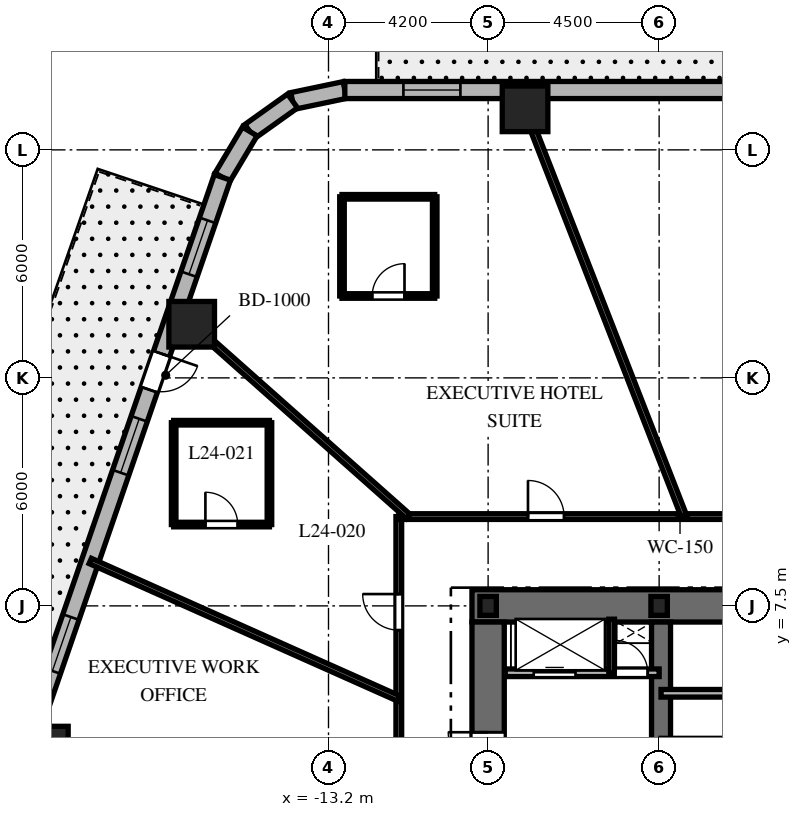
"""IFC4 building model, lengths in metres.
Left out: names, types, materials, properties, quantities, classifications, styles, units other than length and angle.
Written with IfcOpenShell. Run it as: python <this file> out.ifc"""

import sys

from ifc_helpers import new_model, si_unit, direction, frame, frame_2d, origin, origin_2d, place, context, subcontext, project, spatial, rectangle, i_section, extrude, element, fill, save


model = new_model("IFC4")
c1 = context("Model", 3, precision=1e-05, world=origin(), true_north=direction((0.0, 1.0)))
c2 = subcontext(c1, "Body", "Model", "MODEL_VIEW")
j1 = project(units=[si_unit("LENGTHUNIT", "METRE"), si_unit("PLANEANGLEUNIT", "RADIAN")], contexts=[c1])
p1 = place(None, origin())
s1 = spatial("IfcSite", under=j1, at=p1, CompositionType="ELEMENT")
p2 = place(p1, origin())
s2 = spatial("IfcBuilding", under=s1, at=p2, CompositionType="ELEMENT")
p3 = place(p2, frame((0.0, 0.0, 102.5)))
s3 = spatial("IfcBuildingStorey", under=s2, at=p3, CompositionType="ELEMENT", Elevation=102.5)
p4 = place(p3, frame((-9.425, 7.5, 0.0), z_axis=(0.0, 0.0, 1.0), x_axis=(1.0, 0.0, 0.0)))
e1 = element("IfcWall", 1, at=p4, inside=s3, PredefinedType="SHEAR", context=c2, shape_type="SweptSolid", body=[
    extrude(rectangle(XDim=9.475, YDim=0.85, at=frame_2d((4.738, 0.0))), origin(), (0.0, 0.0, 1.0), 3.7),
])
p5 = place(p3, frame((-9.0, -7.075, 0.0), z_axis=(0.0, 0.0, 1.0), x_axis=(0.0, 1.0, 0.0)))
e2 = element("IfcWall", 2, at=p5, inside=s3, PredefinedType="SHEAR", context=c2, shape_type="SweptSolid", body=[
    extrude(rectangle(XDim=14.15, YDim=0.85, at=frame_2d((7.075, 0.0))), origin(), (0.0, 0.0, 1.0), 3.7),
])
p6 = place(p5, frame((10.2, 0.0, 0.0)))
e3 = element("IfcOpeningElement", 3, at=p6, cuts=e2, PredefinedType="OPENING", context=c2, shape_type="SweptSolid", body=[
    extrude(rectangle(XDim=1.05, YDim=2.15, at=frame_2d((0.525, 1.075))), frame((0.0, 0.435, 0.0), z_axis=(0.0, -1.0, 0.0), x_axis=(1.0, 0.0, 0.0)), (0.0, 0.0, 1.0), 0.87),
])
p7 = place(p3, frame((-4.45, 2.25, 0.0), z_axis=(0.0, 0.0, 1.0), x_axis=(0.0, 1.0, 0.0)))
e4 = element("IfcWall", 4, at=p7, inside=s3, PredefinedType="SHEAR", context=c2, shape_type="SweptSolid", body=[
    extrude(rectangle(XDim=4.825, YDim=0.5, at=frame_2d((2.413, 0.0))), origin(), (0.0, 0.0, 1.0), 3.7),
])
for number, where, z_axis, x_axis in (
    (5, (-4.5, 7.5, 0.0), (0.0, 0.0, 1.0), (1.0, 0.0, 0.0)),
    (6, (-9.0, 7.5, 0.0), (0.0, 0.0, 1.0), (1.0, 0.0, 0.0)),
):
    element("IfcColumn", number, at=place(p3, frame(where, z_axis=z_axis, x_axis=x_axis)), inside=s3, PredefinedType="COLUMN", context=c2, shape_type="SweptSolid", body=[
        extrude(i_section(OverallWidth=0.432, OverallDepth=0.498, WebThickness=0.056, FlangeThickness=0.089, at=origin_2d()), origin(), (0.0, 0.0, 1.0), 3.7),
    ])
for number, where, z_axis, x_axis in (
    (7, (-8.028, 20.58, 0.0), (0.0, 0.0, 1.0), (1.0, 0.0, 0.0)),
    (8, (-16.8, 14.911, 0.0), (0.0, 0.0, 1.0), (1.0, 0.0, 0.0)),
    (9, (-20.65, 3.731, 0.0), (0.0, 0.0, 1.0), (1.0, 0.0, 0.0)),
):
    element("IfcColumn", number, at=place(p3, frame(where, z_axis=z_axis, x_axis=x_axis)), inside=s3, PredefinedType="COLUMN", context=c2, shape_type="SweptSolid", body=[
        extrude(rectangle(XDim=1.2, YDim=1.2, at=origin_2d()), origin(), (0.0, 0.0, 1.0), 3.7),
    ])
p8 = place(p3, frame((-12.771, 21.075, 0.0), z_axis=(0.0, 0.0, 1.0), x_axis=(-0.97874281988, -0.205091424819, 0.0)))
e10 = element("IfcWall", 10, at=p8, inside=s3, PredefinedType="SOLIDWALL", context=c2, shape_type="SweptSolid", body=[
    extrude(rectangle(XDim=1.406, YDim=0.45, at=frame_2d((0.703, 0.0))), origin(), (0.0, 0.0, 1.0), 3.4),
])
p9 = place(p3, frame((-14.146, 20.787, 0.0), z_axis=(0.0, 0.0, 1.0), x_axis=(-0.814162929117, -0.580636482536, 0.0)))
e11 = element("IfcWall", 11, at=p9, inside=s3, PredefinedType="SOLIDWALL", context=c2, shape_type="SweptSolid", body=[
    extrude(rectangle(XDim=1.382, YDim=0.45, at=frame_2d((0.691, 0.0))), origin(), (0.0, 0.0, 1.0), 3.4),
])
p10 = place(p3, frame((-15.272, 19.984, 0.0), z_axis=(0.0, 0.0, 1.0), x_axis=(-0.512579347361, -0.858639862025, 0.0)))
e12 = element("IfcWall", 12, at=p10, inside=s3, PredefinedType="SOLIDWALL", context=c2, shape_type="SweptSolid", body=[
    extrude(rectangle(XDim=1.406, YDim=0.45, at=frame_2d((0.703, 0.0))), origin(), (0.0, 0.0, 1.0), 3.4),
])
p11 = place(p3, frame((11.012, 21.075, 0.0), z_axis=(0.0, 0.0, 1.0), x_axis=(-1.0, 0.0, 0.0)))
e13 = element("IfcWall", 13, at=p11, inside=s3, PredefinedType="SOLIDWALL", context=c2, shape_type="SweptSolid", body=[
    extrude(rectangle(XDim=23.782, YDim=0.45, at=frame_2d((11.891, 0.0))), origin(), (0.0, 0.0, 1.0), 3.4),
])
p12 = place(p11, frame((2.473, 0.0, 0.0)))
e14 = element("IfcOpeningElement", 14, at=p12, cuts=e13, PredefinedType="OPENING", context=c2, shape_type="SweptSolid", body=[
    extrude(rectangle(XDim=0.95, YDim=2.15, at=frame_2d((0.475, 1.075))), frame((0.0, 0.235, 0.0), z_axis=(0.0, -1.0, 0.0), x_axis=(1.0, 0.0, 0.0)), (0.0, 0.0, 1.0), 0.47),
])
p13 = place(p11, frame((11.142, 0.0, 0.8)))
e15 = element("IfcOpeningElement", 15, at=p13, cuts=e13, PredefinedType="OPENING", context=c2, shape_type="SweptSolid", body=[
    extrude(rectangle(XDim=1.5, YDim=1.8, at=frame_2d((0.75, 0.9))), frame((0.0, 0.235, 0.0), z_axis=(0.0, -1.0, 0.0), x_axis=(1.0, 0.0, 0.0)), (0.0, 0.0, 1.0), 0.47),
])
p14 = place(p11, frame((20.741, 0.0, 0.8)))
e16 = element("IfcOpeningElement", 16, at=p14, cuts=e13, PredefinedType="OPENING", context=c2, shape_type="SweptSolid", body=[
    extrude(rectangle(XDim=1.5, YDim=1.8, at=frame_2d((0.75, 0.9))), frame((0.0, 0.235, 0.0), z_axis=(0.0, -1.0, 0.0), x_axis=(1.0, 0.0, 0.0)), (0.0, 0.0, 1.0), 0.47),
])
p15 = place(p3, frame((-15.992, 18.777, 0.0), z_axis=(0.0, 0.0, 1.0), x_axis=(-0.325606988926, -0.945505202927, 0.0)))
e17 = element("IfcWall", 17, at=p15, inside=s3, PredefinedType="SOLIDWALL", context=c2, shape_type="SweptSolid", body=[
    extrude(rectangle(XDim=19.669, YDim=0.45, at=frame_2d((9.835, 0.0))), origin(), (0.0, 0.0, 1.0), 3.4),
])
p16 = place(p15, frame((4.909, 0.0, 0.0)))
e18 = element("IfcOpeningElement", 18, at=p16, cuts=e17, PredefinedType="OPENING", context=c2, shape_type="SweptSolid", body=[
    extrude(rectangle(XDim=1.0, YDim=2.15, at=frame_2d((0.5, 1.075))), frame((0.0, 0.235, 0.0), z_axis=(0.0, -1.0, 0.0), x_axis=(1.0, 0.0, 0.0)), (0.0, 0.0, 1.0), 0.47),
])
p17 = place(p15, frame((1.197, 0.0, 0.8)))
e19 = element("IfcOpeningElement", 19, at=p17, cuts=e17, PredefinedType="OPENING", context=c2, shape_type="SweptSolid", body=[
    extrude(rectangle(XDim=1.5, YDim=1.8, at=frame_2d((0.75, 0.9))), frame((0.0, 0.235, 0.0), z_axis=(0.0, -1.0, 0.0), x_axis=(1.0, 0.0, 0.0)), (0.0, 0.0, 1.0), 0.47),
])
p18 = place(p15, frame((6.72, 0.0, 0.8)))
e20 = element("IfcOpeningElement", 20, at=p18, cuts=e17, PredefinedType="OPENING", context=c2, shape_type="SweptSolid", body=[
    extrude(rectangle(XDim=1.5, YDim=1.8, at=frame_2d((0.75, 0.9))), frame((0.0, 0.235, 0.0), z_axis=(0.0, -1.0, 0.0), x_axis=(1.0, 0.0, 0.0)), (0.0, 0.0, 1.0), 0.47),
])
p19 = place(p15, frame((12.238, 0.0, 0.8)))
e21 = element("IfcOpeningElement", 21, at=p19, cuts=e17, PredefinedType="OPENING", context=c2, shape_type="SweptSolid", body=[
    extrude(rectangle(XDim=1.5, YDim=1.8, at=frame_2d((0.75, 0.9))), frame((0.0, 0.235, 0.0), z_axis=(0.0, -1.0, 0.0), x_axis=(1.0, 0.0, 0.0)), (0.0, 0.0, 1.0), 0.47),
])
p20 = place(p15, frame((16.918, 0.0, 0.8)))
e22 = element("IfcOpeningElement", 22, at=p20, cuts=e17, PredefinedType="OPENING", context=c2, shape_type="SweptSolid", body=[
    extrude(rectangle(XDim=1.5, YDim=1.8, at=frame_2d((0.75, 0.9))), frame((0.0, 0.235, 0.0), z_axis=(0.0, -1.0, 0.0), x_axis=(1.0, 0.0, 0.0)), (0.0, 0.0, 1.0), 0.47),
])
p21 = place(p3, frame((-8.55, 5.74, 0.0), z_axis=(0.0, 0.0, 1.0), x_axis=(1.0, 0.0, 0.0)))
e23 = element("IfcWall", 23, at=p21, inside=s3, PredefinedType="PARTITIONING", context=c2, shape_type="SweptSolid", body=[
    extrude(rectangle(XDim=4.05, YDim=0.2, at=frame_2d((2.025, 0.0))), origin(), (0.0, 0.0, 1.0), 3.4),
])
p22 = place(p21, frame((0.75, 0.0, 0.0)))
e24 = element("IfcOpeningElement", 24, at=p22, cuts=e23, PredefinedType="OPENING", context=c2, shape_type="SweptSolid", body=[
    extrude(rectangle(XDim=1.1, YDim=2.2, at=frame_2d((0.55, 1.1))), frame((0.0, 0.11, 0.0), z_axis=(0.0, -1.0, 0.0), x_axis=(1.0, 0.0, 0.0)), (0.0, 0.0, 1.0), 0.22),
])
p23 = place(p21, frame((2.9, 0.0, 0.0)))
e25 = element("IfcOpeningElement", 25, at=p23, cuts=e23, PredefinedType="OPENING", context=c2, shape_type="SweptSolid", body=[
    extrude(rectangle(XDim=0.85, YDim=2.03, at=frame_2d((0.425, 1.015))), frame((0.0, 0.11, 0.0), z_axis=(0.0, -1.0, 0.0), x_axis=(1.0, 0.0, 0.0)), (0.0, 0.0, 1.0), 0.22),
])
p24 = place(p3, frame((-5.75, 5.74, 0.0), z_axis=(0.0, 0.0, 1.0), x_axis=(0.0, 1.0, 0.0)))
e26 = element("IfcWall", 26, at=p24, inside=s3, PredefinedType="PARTITIONING", context=c2, shape_type="SweptSolid", body=[
    extrude(rectangle(XDim=1.41, YDim=0.15, at=frame_2d((0.705, 0.0))), origin(), (0.0, 0.0, 1.0), 3.4),
])
p25 = place(p3, frame((-4.45, 5.2, 0.0), z_axis=(0.0, 0.0, 1.0), x_axis=(1.0, 0.0, 0.0)))
e27 = element("IfcWall", 27, at=p25, inside=s3, PredefinedType="PARTITIONING", context=c2, shape_type="SweptSolid", body=[
    extrude(rectangle(XDim=4.5, YDim=0.2, at=frame_2d((2.25, 0.0))), origin(), (0.0, 0.0, 1.0), 3.4),
])
p26 = place(p3, frame((-11.35, -9.85, 0.0), z_axis=(0.0, 0.0, 1.0), x_axis=(0.0, 1.0, 0.0)))
e28 = element("IfcWall", 28, at=p26, inside=s3, PredefinedType="PARTITIONING", context=c2, shape_type="SweptSolid", body=[
    extrude(rectangle(XDim=19.7, YDim=0.15, at=frame_2d((9.85, 0.0))), origin(), (0.0, 0.0, 1.0), 2.84),
])
p27 = place(p26, frame((16.711, 0.0, 0.0)))
e29 = element("IfcOpeningElement", 29, at=p27, cuts=e28, PredefinedType="OPENING", context=c2, shape_type="SweptSolid", body=[
    extrude(rectangle(XDim=0.95, YDim=2.03, at=frame_2d((0.475, 1.015))), frame((0.0, 0.085, 0.0), z_axis=(0.0, -1.0, 0.0), x_axis=(1.0, 0.0, 0.0)), (0.0, 0.0, 1.0), 0.17),
])
p28 = place(p26, frame((12.968, 0.0, 0.0)))
e30 = element("IfcOpeningElement", 30, at=p28, cuts=e28, PredefinedType="OPENING", context=c2, shape_type="SweptSolid", body=[
    extrude(rectangle(XDim=0.9, YDim=2.03, at=frame_2d((0.45, 1.015))), frame((0.0, 0.085, 0.0), z_axis=(0.0, -1.0, 0.0), x_axis=(1.0, 0.0, 0.0)), (0.0, 0.0, 1.0), 0.17),
])
p29 = place(p26, frame((10.325, 0.0, 0.0)))
e31 = element("IfcOpeningElement", 31, at=p29, cuts=e28, PredefinedType="OPENING", context=c2, shape_type="SweptSolid", body=[
    extrude(rectangle(XDim=0.9, YDim=2.03, at=frame_2d((0.45, 1.015))), frame((0.0, 0.085, 0.0), z_axis=(0.0, -1.0, 0.0), x_axis=(1.0, 0.0, 0.0)), (0.0, 0.0, 1.0), 0.17),
])
p30 = place(p26, frame((7.706, 0.0, 0.0)))
e32 = element("IfcOpeningElement", 32, at=p30, cuts=e28, PredefinedType="OPENING", context=c2, shape_type="SweptSolid", body=[
    extrude(rectangle(XDim=0.95, YDim=2.03, at=frame_2d((0.475, 1.015))), frame((0.0, 0.085, 0.0), z_axis=(0.0, -1.0, 0.0), x_axis=(1.0, 0.0, 0.0)), (0.0, 0.0, 1.0), 0.17),
])
p31 = place(p26, frame((3.008, 0.0, 0.0)))
e33 = element("IfcOpeningElement", 33, at=p31, cuts=e28, PredefinedType="OPENING", context=c2, shape_type="SweptSolid", body=[
    extrude(rectangle(XDim=0.95, YDim=2.03, at=frame_2d((0.475, 1.015))), frame((0.0, 0.085, 0.0), z_axis=(0.0, -1.0, 0.0), x_axis=(1.0, 0.0, 0.0)), (0.0, 0.0, 1.0), 0.17),
])
p32 = place(p3, frame((-11.35, 9.85, 0.0), z_axis=(0.0, 0.0, 1.0), x_axis=(1.0, 0.0, 0.0)))
e34 = element("IfcWall", 34, at=p32, inside=s3, PredefinedType="PARTITIONING", context=c2, shape_type="SweptSolid", body=[
    extrude(rectangle(XDim=22.7, YDim=0.15, at=frame_2d((11.35, 0.0))), origin(), (0.0, 0.0, 1.0), 2.84),
])
p33 = place(p32, frame((17.237, 0.0, 0.0)))
e35 = element("IfcOpeningElement", 35, at=p33, cuts=e34, PredefinedType="OPENING", context=c2, shape_type="SweptSolid", body=[
    extrude(rectangle(XDim=0.95, YDim=2.03, at=frame_2d((0.475, 1.015))), frame((0.0, 0.085, 0.0), z_axis=(0.0, -1.0, 0.0), x_axis=(1.0, 0.0, 0.0)), (0.0, 0.0, 1.0), 0.17),
])
p34 = place(p32, frame((10.45, 0.0, 0.0)))
e36 = element("IfcOpeningElement", 36, at=p34, cuts=e34, PredefinedType="OPENING", context=c2, shape_type="SweptSolid", body=[
    extrude(rectangle(XDim=0.95, YDim=2.03, at=frame_2d((0.475, 1.015))), frame((0.0, 0.085, 0.0), z_axis=(0.0, -1.0, 0.0), x_axis=(1.0, 0.0, 0.0)), (0.0, 0.0, 1.0), 0.17),
])
p35 = place(p32, frame((3.399, 0.0, 0.0)))
e37 = element("IfcOpeningElement", 37, at=p35, cuts=e34, PredefinedType="OPENING", context=c2, shape_type="SweptSolid", body=[
    extrude(rectangle(XDim=0.95, YDim=2.03, at=frame_2d((0.475, 1.015))), frame((0.0, 0.085, 0.0), z_axis=(0.0, -1.0, 0.0), x_axis=(1.0, 0.0, 0.0)), (0.0, 0.0, 1.0), 0.17),
])
p36 = place(p3, frame((-3.842, 9.85, 0.0), z_axis=(0.0, 0.0, 1.0), x_axis=(-0.363432685593, 0.931620460833, 0.0)))
e38 = element("IfcWall", 38, at=p36, inside=s3, PredefinedType="PARTITIONING", context=c2, shape_type="SweptSolid", body=[
    extrude(rectangle(XDim=12.049, YDim=0.15, at=frame_2d((6.024, 0.0))), origin(), (0.0, 0.0, 1.0), 2.54),
])
p37 = place(p3, frame((-11.098, 9.85, 0.0), z_axis=(0.0, 0.0, 1.0), x_axis=(-0.747904295103, 0.663806572253, 0.0)))
e39 = element("IfcWall", 39, at=p37, inside=s3, PredefinedType="PARTITIONING", context=c2, shape_type="SweptSolid", body=[
    extrude(rectangle(XDim=8.16, YDim=0.15, at=frame_2d((4.08, 0.0))), origin(), (0.0, 0.0, 1.0), 2.54),
])
p38 = place(p3, frame((-11.35, 5.062, 0.0), z_axis=(0.0, 0.0, 1.0), x_axis=(-0.91329663997, 0.407295037312, 0.0)))
e40 = element("IfcWall", 40, at=p38, inside=s3, PredefinedType="PARTITIONING", context=c2, shape_type="SweptSolid", body=[
    extrude(rectangle(XDim=8.889, YDim=0.15, at=frame_2d((4.445, 0.0))), origin(), (0.0, 0.0, 1.0), 2.54),
])
p39 = place(p3, frame((-12.845, 15.655, 0.0), z_axis=(0.0, 0.0, 1.0), x_axis=(1.0, 0.0, 0.0)))
e41 = element("IfcWall", 41, at=p39, inside=s3, PredefinedType="PARTITIONING", context=c2, shape_type="SweptSolid", body=[
    extrude(rectangle(XDim=2.44, YDim=0.12, at=frame_2d((1.22, 0.0))), origin(), (0.0, 0.0, 1.0), 3.4),
])
p40 = place(p39, frame((0.795, 0.0, 0.0)))
e42 = element("IfcOpeningElement", 42, at=p40, cuts=e41, PredefinedType="OPENING", context=c2, shape_type="SweptSolid", body=[
    extrude(rectangle(XDim=0.85, YDim=2.03, at=frame_2d((0.425, 1.015))), frame((0.0, 0.07, 0.0), z_axis=(0.0, -1.0, 0.0), x_axis=(1.0, 0.0, 0.0)), (0.0, 0.0, 1.0), 0.14),
])
p41 = place(p3, frame((-10.405, 15.655, 0.0), z_axis=(0.0, 0.0, 1.0), x_axis=(0.0, 1.0, 0.0)))
e43 = element("IfcWall", 43, at=p41, inside=s3, PredefinedType="PARTITIONING", context=c2, shape_type="SweptSolid", body=[
    extrude(rectangle(XDim=2.61, YDim=0.12, at=frame_2d((1.305, 0.0))), origin(), (0.0, 0.0, 1.0), 3.4),
])
p42 = place(p3, frame((-10.405, 18.265, 0.0), z_axis=(0.0, 0.0, 1.0), x_axis=(-1.0, 0.0, 0.0)))
e44 = element("IfcWall", 44, at=p42, inside=s3, PredefinedType="PARTITIONING", context=c2, shape_type="SweptSolid", body=[
    extrude(rectangle(XDim=2.44, YDim=0.12, at=frame_2d((1.22, 0.0))), origin(), (0.0, 0.0, 1.0), 2.54),
])
p43 = place(p3, frame((-12.845, 18.265, 0.0), z_axis=(0.0, 0.0, 1.0), x_axis=(0.0, -1.0, 0.0)))
e45 = element("IfcWall", 45, at=p43, inside=s3, PredefinedType="PARTITIONING", context=c2, shape_type="SweptSolid", body=[
    extrude(rectangle(XDim=2.61, YDim=0.12, at=frame_2d((1.305, 0.0))), origin(), (0.0, 0.0, 1.0), 2.54),
])
p44 = place(p3, frame((-17.274, 9.64, 0.0), z_axis=(0.0, 0.0, 1.0), x_axis=(1.0, 0.0, 0.0)))
e46 = element("IfcWall", 46, at=p44, inside=s3, PredefinedType="PARTITIONING", context=c2, shape_type="SweptSolid", body=[
    extrude(rectangle(XDim=2.52, YDim=0.12, at=frame_2d((1.26, 0.0))), origin(), (0.0, 0.0, 1.0), 2.972),
])
p45 = place(p44, frame((0.835, 0.0, 0.0)))
e47 = element("IfcOpeningElement", 47, at=p45, cuts=e46, PredefinedType="OPENING", context=c2, shape_type="SweptSolid", body=[
    extrude(rectangle(XDim=0.85, YDim=2.03, at=frame_2d((0.425, 1.015))), frame((0.0, 0.07, 0.0), z_axis=(0.0, -1.0, 0.0), x_axis=(1.0, 0.0, 0.0)), (0.0, 0.0, 1.0), 0.14),
])
p46 = place(p3, frame((-14.754, 9.64, 0.0), z_axis=(0.0, 0.0, 1.0), x_axis=(0.0, 1.0, 0.0)))
e48 = element("IfcWall", 48, at=p46, inside=s3, PredefinedType="PARTITIONING", context=c2, shape_type="SweptSolid", body=[
    extrude(rectangle(XDim=2.68, YDim=0.12, at=frame_2d((1.34, 0.0))), origin(), (0.0, 0.0, 1.0), 2.972),
])
p47 = place(p3, frame((-14.754, 12.32, 0.0), z_axis=(0.0, 0.0, 1.0), x_axis=(-1.0, 0.0, 0.0)))
e49 = element("IfcWall", 49, at=p47, inside=s3, PredefinedType="PARTITIONING", context=c2, shape_type="SweptSolid", body=[
    extrude(rectangle(XDim=2.52, YDim=0.12, at=frame_2d((1.26, 0.0))), origin(), (0.0, 0.0, 1.0), 3.4),
])
p48 = place(p3, frame((-17.274, 12.32, 0.0), z_axis=(0.0, 0.0, 1.0), x_axis=(0.0, -1.0, 0.0)))
e50 = element("IfcWall", 50, at=p48, inside=s3, PredefinedType="PARTITIONING", context=c2, shape_type="SweptSolid", body=[
    extrude(rectangle(XDim=2.68, YDim=0.12, at=frame_2d((1.34, 0.0))), origin(), (0.0, 0.0, 1.0), 3.4),
])
p49 = place(p14, origin())
e51 = element("IfcWindow", 51, at=p49, inside=s3, PartitioningType="SINGLE_PANEL", PredefinedType="WINDOW", context=c2, shape_type="SweptSolid", body=[
    extrude(rectangle(XDim=1.5, YDim=1.8, at=frame_2d((0.75, 0.9))), frame((0.0, 0.03, 0.0), z_axis=(0.0, -1.0, 0.0), x_axis=(1.0, 0.0, 0.0)), (0.0, 0.0, 1.0), 0.06),
])
fill(e16, e51)
p50 = place(p16, origin())
e52 = element("IfcDoor", 52, at=p50, inside=s3, OperationType="SINGLE_SWING_LEFT", PredefinedType="DOOR", context=c2, shape_type="SweptSolid", body=[
    extrude(rectangle(XDim=1.0, YDim=2.15, at=frame_2d((0.5, 1.075))), frame((0.0, 0.025, 0.0), z_axis=(0.0, -1.0, 0.0), x_axis=(1.0, 0.0, 0.0)), (0.0, 0.0, 1.0), 0.05),
])
fill(e18, e52)
p51 = place(p17, origin())
e53 = element("IfcWindow", 53, at=p51, inside=s3, PartitioningType="SINGLE_PANEL", PredefinedType="WINDOW", context=c2, shape_type="SweptSolid", body=[
    extrude(rectangle(XDim=1.5, YDim=1.8, at=frame_2d((0.75, 0.9))), frame((0.0, 0.03, 0.0), z_axis=(0.0, -1.0, 0.0), x_axis=(1.0, 0.0, 0.0)), (0.0, 0.0, 1.0), 0.06),
])
fill(e19, e53)
p52 = place(p18, origin())
e54 = element("IfcWindow", 54, at=p52, inside=s3, PartitioningType="SINGLE_PANEL", PredefinedType="WINDOW", context=c2, shape_type="SweptSolid", body=[
    extrude(rectangle(XDim=1.5, YDim=1.8, at=frame_2d((0.75, 0.9))), frame((0.0, 0.03, 0.0), z_axis=(0.0, -1.0, 0.0), x_axis=(1.0, 0.0, 0.0)), (0.0, 0.0, 1.0), 0.06),
])
fill(e20, e54)
p53 = place(p19, origin())
e55 = element("IfcWindow", 55, at=p53, inside=s3, PartitioningType="SINGLE_PANEL", PredefinedType="WINDOW", context=c2, shape_type="SweptSolid", body=[
    extrude(rectangle(XDim=1.5, YDim=1.8, at=frame_2d((0.75, 0.9))), frame((0.0, 0.03, 0.0), z_axis=(0.0, -1.0, 0.0), x_axis=(1.0, 0.0, 0.0)), (0.0, 0.0, 1.0), 0.06),
])
fill(e21, e55)
p54 = place(p6, origin())
e56 = element("IfcDoor", 56, at=p54, inside=s3, OperationType="SINGLE_SWING_RIGHT", PredefinedType="DOOR", context=c2, shape_type="SweptSolid", body=[
    extrude(rectangle(XDim=1.05, YDim=2.15, at=frame_2d((0.525, 1.075))), frame((0.0, 0.025, 0.0), z_axis=(0.0, -1.0, 0.0), x_axis=(1.0, 0.0, 0.0)), (0.0, 0.0, 1.0), 0.05),
])
fill(e3, e56)
p55 = place(p22, origin())
e57 = element("IfcDoor", 57, at=p55, inside=s3, OperationType="SLIDING_TO_LEFT", PredefinedType="DOOR", context=c2, shape_type="SweptSolid", body=[
    extrude(rectangle(XDim=1.1, YDim=2.2, at=frame_2d((0.55, 1.1))), frame((0.0, 0.025, 0.0), z_axis=(0.0, -1.0, 0.0), x_axis=(1.0, 0.0, 0.0)), (0.0, 0.0, 1.0), 0.05),
])
fill(e24, e57)
p56 = place(p23, origin())
e58 = element("IfcDoor", 58, at=p56, inside=s3, OperationType="SINGLE_SWING_LEFT", PredefinedType="DOOR", context=c2, shape_type="SweptSolid", body=[
    extrude(rectangle(XDim=0.85, YDim=2.03, at=frame_2d((0.425, 1.015))), frame((0.0, 0.025, 0.0), z_axis=(0.0, -1.0, 0.0), x_axis=(1.0, 0.0, 0.0)), (0.0, 0.0, 1.0), 0.05),
])
fill(e25, e58)
p57 = place(p35, origin())
e59 = element("IfcDoor", 59, at=p57, inside=s3, OperationType="SINGLE_SWING_LEFT", PredefinedType="DOOR", context=c2, shape_type="SweptSolid", body=[
    extrude(rectangle(XDim=0.95, YDim=2.03, at=frame_2d((0.475, 1.015))), frame((0.0, 0.025, 0.0), z_axis=(0.0, -1.0, 0.0), x_axis=(1.0, 0.0, 0.0)), (0.0, 0.0, 1.0), 0.05),
])
fill(e37, e59)
p58 = place(p40, origin())
e60 = element("IfcDoor", 60, at=p58, inside=s3, OperationType="SINGLE_SWING_RIGHT", PredefinedType="DOOR", context=c2, shape_type="SweptSolid", body=[
    extrude(rectangle(XDim=0.85, YDim=2.03, at=frame_2d((0.425, 1.015))), frame((0.0, 0.025, 0.0), z_axis=(0.0, -1.0, 0.0), x_axis=(1.0, 0.0, 0.0)), (0.0, 0.0, 1.0), 0.05),
])
fill(e42, e60)
p59 = place(p27, origin())
e61 = element("IfcDoor", 61, at=p59, inside=s3, OperationType="SINGLE_SWING_RIGHT", PredefinedType="DOOR", context=c2, shape_type="SweptSolid", body=[
    extrude(rectangle(XDim=0.95, YDim=2.03, at=frame_2d((0.475, 1.015))), frame((0.0, 0.025, 0.0), z_axis=(0.0, -1.0, 0.0), x_axis=(1.0, 0.0, 0.0)), (0.0, 0.0, 1.0), 0.05),
])
fill(e29, e61)
p60 = place(p45, origin())
e62 = element("IfcDoor", 62, at=p60, inside=s3, OperationType="SINGLE_SWING_LEFT", PredefinedType="DOOR", context=c2, shape_type="SweptSolid", body=[
    extrude(rectangle(XDim=0.85, YDim=2.03, at=frame_2d((0.425, 1.015))), frame((0.0, 0.025, 0.0), z_axis=(0.0, -1.0, 0.0), x_axis=(1.0, 0.0, 0.0)), (0.0, 0.0, 1.0), 0.05),
])
fill(e47, e62)
save(model, sys.argv[1])
